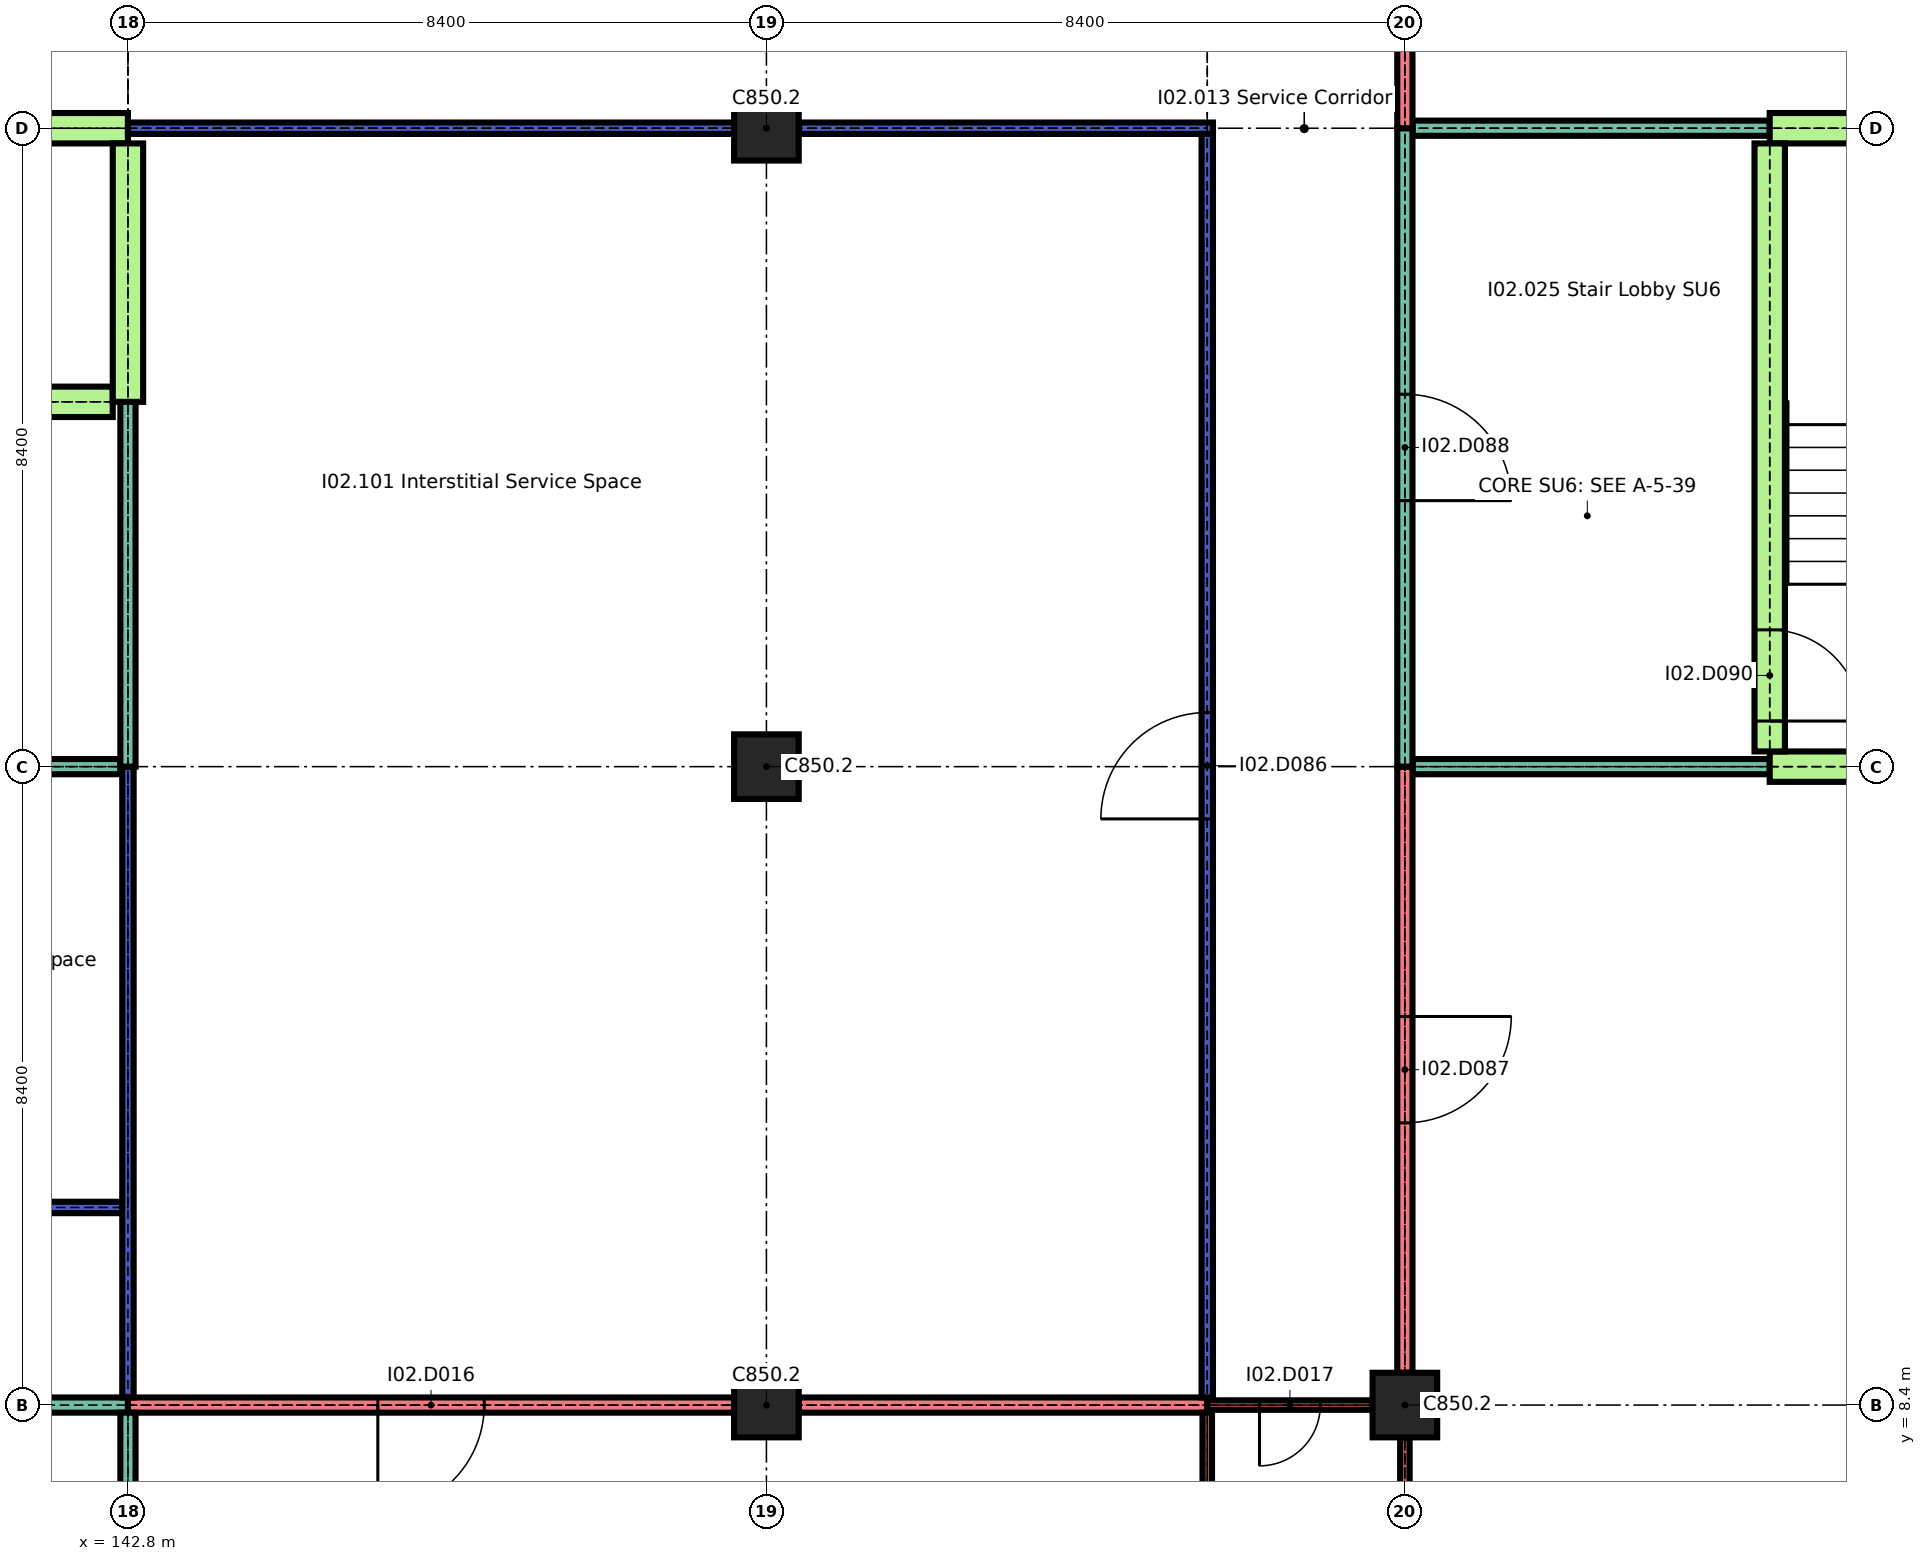
"""IFC4 building model, lengths in metres.
Left out: names, types, materials, properties, quantities, classifications, styles, units other than length and angle.
Written with IfcOpenShell. Run it as: python <this file> out.ifc"""

import sys

from ifc_helpers import new_model, si_unit, direction, frame, frame_2d, origin, origin_2d, place, context, subcontext, project, spatial, rectangle, extrude, element, fill, save


model = new_model("IFC4")
c1 = context("Model", 3, precision=1e-05, world=origin(), true_north=direction((0.0, 1.0)))
c2 = subcontext(c1, "Body", "Model", "MODEL_VIEW")
j1 = project(units=[si_unit("LENGTHUNIT", "METRE"), si_unit("PLANEANGLEUNIT", "RADIAN")], contexts=[c1])
p1 = place(None, origin())
s1 = spatial("IfcSite", under=j1, at=p1, CompositionType="ELEMENT")
p2 = place(p1, origin())
s2 = spatial("IfcBuilding", under=s1, at=p2, CompositionType="ELEMENT")
p3 = place(p2, frame((0.0, 0.0, 12.9)))
s3 = spatial("IfcBuildingStorey", under=s2, at=p3, CompositionType="ELEMENT", Elevation=12.9)
for number, where, z_axis, x_axis in (
    (1, (151.2, 8.4, 0.0), (0.0, 0.0, 1.0), (1.0, 0.0, 0.0)),
    (2, (159.6, 8.4, 0.0), (0.0, 0.0, 1.0), (1.0, 0.0, 0.0)),
    (3, (151.2, 16.8, 0.0), (0.0, 0.0, 1.0), (1.0, 0.0, 0.0)),
    (4, (151.2, 25.2, 0.0), (0.0, 0.0, 1.0), (1.0, 0.0, 0.0)),
):
    element("IfcColumn", number, at=place(p3, frame(where, z_axis=z_axis, x_axis=x_axis)), inside=s3, PredefinedType="COLUMN", context=c2, shape_type="SweptSolid", body=[
        extrude(rectangle(XDim=0.85, YDim=0.85, at=origin_2d()), origin(), (0.0, 0.0, 1.0), 2.04),
    ])
p4 = place(p3, frame((134.4, 8.4, 0.0), z_axis=(0.0, 0.0, 1.0), x_axis=(1.0, 0.0, 0.0)))
e5 = element("IfcWall", 5, at=p4, inside=s3, PredefinedType="PARTITIONING", context=c2, shape_type="SweptSolid", body=[
    extrude(rectangle(XDim=8.4, YDim=0.2, at=frame_2d((4.2, 0.0))), origin(), (0.0, 0.0, 1.0), 2.04),
])
p5 = place(p4, frame((3.5, 0.0, 0.0)))
e6 = element("IfcOpeningElement", 6, at=p5, cuts=e5, PredefinedType="OPENING", context=c2, shape_type="SweptSolid", body=[
    extrude(rectangle(XDim=1.4, YDim=2.0, at=frame_2d((0.7, 1.0))), frame((0.0, 0.11, 0.0), z_axis=(0.0, -1.0, 0.0), x_axis=(1.0, 0.0, 0.0)), (0.0, 0.0, 1.0), 0.22),
])
p6 = place(p3, frame((142.8, 8.4, 0.0), z_axis=(0.0, 0.0, 1.0), x_axis=(1.0, 0.0, 0.0)))
e7 = element("IfcWall", 7, at=p6, inside=s3, PredefinedType="SOLIDWALL", context=c2, shape_type="SweptSolid", body=[
    extrude(rectangle(XDim=7.975, YDim=0.2, at=frame_2d((3.987, 0.0))), origin(), (0.0, 0.0, 1.0), 2.04),
])
p7 = place(p6, frame((3.288, 0.0, 0.0)))
e8 = element("IfcOpeningElement", 8, at=p7, cuts=e7, PredefinedType="OPENING", context=c2, shape_type="SweptSolid", body=[
    extrude(rectangle(XDim=1.4, YDim=2.0, at=frame_2d((0.7, 1.0))), frame((0.0, 0.11, 0.0), z_axis=(0.0, -1.0, 0.0), x_axis=(1.0, 0.0, 0.0)), (0.0, 0.0, 1.0), 0.22),
])
p8 = place(p3, frame((151.625, 8.4, 0.0), z_axis=(0.0, 0.0, 1.0), x_axis=(1.0, 0.0, 0.0)))
e9 = element("IfcWall", 9, at=p8, inside=s3, PredefinedType="SOLIDWALL", context=c2, shape_type="SweptSolid", body=[
    extrude(rectangle(XDim=5.375, YDim=0.2, at=frame_2d((2.688, 0.0))), origin(), (0.0, 0.0, 1.0), 2.04),
])
p9 = place(p3, frame((157.0, 8.4, 0.0), z_axis=(0.0, 0.0, 1.0), x_axis=(1.0, 0.0, 0.0)))
e10 = element("IfcWall", 10, at=p9, inside=s3, PredefinedType="SOLIDWALL", context=c2, shape_type="SweptSolid", body=[
    extrude(rectangle(XDim=2.175, YDim=0.125, at=frame_2d((1.087, 0.0))), origin(), (0.0, 0.0, 1.0), 2.04),
])
p10 = place(p9, frame((0.688, 0.0, 0.0)))
e11 = element("IfcOpeningElement", 11, at=p10, cuts=e10, PredefinedType="OPENING", context=c2, shape_type="SweptSolid", body=[
    extrude(rectangle(XDim=0.8, YDim=2.0, at=frame_2d((0.4, 1.0))), frame((0.0, 0.073, 0.0), z_axis=(0.0, -1.0, 0.0), x_axis=(1.0, 0.0, 0.0)), (0.0, 0.0, 1.0), 0.145),
])
p11 = place(p3, frame((134.325, 11.0, 0.0), z_axis=(0.0, 0.0, 1.0), x_axis=(1.0, 0.0, 0.0)))
e12 = element("IfcWall", 12, at=p11, inside=s3, PredefinedType="PARTITIONING", context=c2, shape_type="SweptSolid", body=[
    extrude(rectangle(XDim=8.4, YDim=0.15, at=frame_2d((4.2, 0.0))), origin(), (0.0, 0.0, 1.0), 2.04),
])
p12 = place(p11, frame((3.538, 0.0, 0.0)))
e13 = element("IfcOpeningElement", 13, at=p12, cuts=e12, PredefinedType="OPENING", context=c2, shape_type="SweptSolid", body=[
    extrude(rectangle(XDim=1.4, YDim=2.0, at=frame_2d((0.7, 1.0))), frame((0.0, 0.085, 0.0), z_axis=(0.0, -1.0, 0.0), x_axis=(1.0, 0.0, 0.0)), (0.0, 0.0, 1.0), 0.17),
])
p13 = place(p3, frame((117.7, 16.8, 0.0), z_axis=(0.0, 0.0, 1.0), x_axis=(1.0, 0.0, 0.0)))
e14 = element("IfcWall", 14, at=p13, inside=s3, PredefinedType="PARTITIONING", context=c2, shape_type="SweptSolid", body=[
    extrude(rectangle(XDim=25.0, YDim=0.2, at=frame_2d((12.5, 0.0))), origin(), (0.0, 0.0, 1.0), 2.04),
])
p14 = place(p13, frame((3.15, 0.0, 0.0)))
e15 = element("IfcOpeningElement", 15, at=p14, cuts=e14, PredefinedType="OPENING", context=c2, shape_type="SweptSolid", body=[
    extrude(rectangle(XDim=2.0, YDim=2.0, at=frame_2d((1.0, 1.0))), frame((0.0, 0.11, 0.0), z_axis=(0.0, -1.0, 0.0), x_axis=(1.0, 0.0, 0.0)), (0.0, 0.0, 1.0), 0.22),
])
p15 = place(p13, frame((11.5, 0.0, 0.0)))
e16 = element("IfcOpeningElement", 16, at=p15, cuts=e14, PredefinedType="OPENING", context=c2, shape_type="SweptSolid", body=[
    extrude(rectangle(XDim=2.0, YDim=2.0, at=frame_2d((1.0, 1.0))), frame((0.0, 0.11, 0.0), z_axis=(0.0, -1.0, 0.0), x_axis=(1.0, 0.0, 0.0)), (0.0, 0.0, 1.0), 0.22),
])
p16 = place(p3, frame((159.7, 16.8, 0.0), z_axis=(0.0, 0.0, 1.0), x_axis=(1.0, 0.0, 0.0)))
e17 = element("IfcWall", 17, at=p16, inside=s3, PredefinedType="PARTITIONING", context=c2, shape_type="SweptSolid", body=[
    extrude(rectangle(XDim=4.7, YDim=0.2, at=frame_2d((2.35, 0.0))), origin(), (0.0, 0.0, 1.0), 2.04),
])
p17 = place(p3, frame((164.4, 16.8, 0.0), z_axis=(0.0, 0.0, 1.0), x_axis=(1.0, 0.0, 0.0)))
e18 = element("IfcWall", 18, at=p17, inside=s3, PredefinedType="SHEAR", context=c2, shape_type="SweptSolid", body=[
    extrude(rectangle(XDim=3.45, YDim=0.4, at=frame_2d((1.725, 0.0))), origin(), (0.0, 0.0, 1.0), 2.04),
])
p18 = place(p3, frame((117.8, 21.6, 0.0), z_axis=(0.0, 0.0, 1.0), x_axis=(1.0, 0.0, 0.0)))
e19 = element("IfcWall", 19, at=p18, inside=s3, PredefinedType="SHEAR", context=c2, shape_type="SweptSolid", body=[
    extrude(rectangle(XDim=24.8, YDim=0.4, at=frame_2d((12.4, 0.0))), origin(), (0.0, 0.0, 1.0), 2.04),
])
p19 = place(p18, frame((1.3, 0.0, 0.0)))
e20 = element("IfcOpeningElement", 20, at=p19, cuts=e19, PredefinedType="OPENING", context=c2, shape_type="SweptSolid", body=[
    extrude(rectangle(XDim=1.4, YDim=2.0, at=frame_2d((0.7, 1.0))), frame((0.0, 0.21, 0.0), z_axis=(0.0, -1.0, 0.0), x_axis=(1.0, 0.0, 0.0)), (0.0, 0.0, 1.0), 0.42),
])
p20 = place(p18, frame((5.4, 0.0, 0.0)))
e21 = element("IfcOpeningElement", 21, at=p20, cuts=e19, PredefinedType="OPENING", context=c2, shape_type="SweptSolid", body=[
    extrude(rectangle(XDim=1.4, YDim=2.0, at=frame_2d((0.7, 1.0))), frame((0.0, 0.21, 0.0), z_axis=(0.0, -1.0, 0.0), x_axis=(1.0, 0.0, 0.0)), (0.0, 0.0, 1.0), 0.42),
])
p21 = place(p18, frame((9.6, 0.0, 0.0)))
e22 = element("IfcOpeningElement", 22, at=p21, cuts=e19, PredefinedType="OPENING", context=c2, shape_type="SweptSolid", body=[
    extrude(rectangle(XDim=1.4, YDim=2.0, at=frame_2d((0.7, 1.0))), frame((0.0, 0.21, 0.0), z_axis=(0.0, -1.0, 0.0), x_axis=(1.0, 0.0, 0.0)), (0.0, 0.0, 1.0), 0.42),
])
p22 = place(p3, frame((117.6, 25.2, 0.0), z_axis=(0.0, 0.0, 1.0), x_axis=(1.0, 0.0, 0.0)))
e23 = element("IfcWall", 23, at=p22, inside=s3, PredefinedType="SHEAR", context=c2, shape_type="SweptSolid", body=[
    extrude(rectangle(XDim=25.2, YDim=0.4, at=frame_2d((12.6, 0.0))), origin(), (0.0, 0.0, 1.0), 2.04),
])
p23 = place(p3, frame((142.8, 25.2, 0.0), z_axis=(0.0, 0.0, 1.0), x_axis=(1.0, 0.0, 0.0)))
e24 = element("IfcWall", 24, at=p23, inside=s3, PredefinedType="PARTITIONING", context=c2, shape_type="SweptSolid", body=[
    extrude(rectangle(XDim=7.975, YDim=0.15, at=frame_2d((3.987, 0.0))), origin(), (0.0, 0.0, 1.0), 2.04),
])
p24 = place(p3, frame((151.625, 25.2, 0.0), z_axis=(0.0, 0.0, 1.0), x_axis=(1.0, 0.0, 0.0)))
e25 = element("IfcWall", 25, at=p24, inside=s3, PredefinedType="PARTITIONING", context=c2, shape_type="SweptSolid", body=[
    extrude(rectangle(XDim=5.45, YDim=0.15, at=frame_2d((2.725, 0.0))), origin(), (0.0, 0.0, 1.0), 2.04),
])
p25 = place(p3, frame((159.7, 25.2, 0.0), z_axis=(0.0, 0.0, 1.0), x_axis=(1.0, 0.0, 0.0)))
e26 = element("IfcWall", 26, at=p25, inside=s3, PredefinedType="PARTITIONING", context=c2, shape_type="SweptSolid", body=[
    extrude(rectangle(XDim=4.7, YDim=0.2, at=frame_2d((2.35, 0.0))), origin(), (0.0, 0.0, 1.0), 2.04),
])
p26 = place(p3, frame((164.4, 25.2, 0.0), z_axis=(0.0, 0.0, 1.0), x_axis=(1.0, 0.0, 0.0)))
e27 = element("IfcWall", 27, at=p26, inside=s3, PredefinedType="SHEAR", context=c2, shape_type="SweptSolid", body=[
    extrude(rectangle(XDim=3.45, YDim=0.4, at=frame_2d((1.725, 0.0))), origin(), (0.0, 0.0, 1.0), 2.04),
])
p27 = place(p3, frame((142.8, 3.6, 0.0), z_axis=(0.0, 0.0, 1.0), x_axis=(0.0, 1.0, 0.0)))
e28 = element("IfcWall", 28, at=p27, inside=s3, PredefinedType="PARTITIONING", context=c2, shape_type="SweptSolid", body=[
    extrude(rectangle(XDim=4.7, YDim=0.2, at=frame_2d((2.35, 0.0))), origin(), (0.0, 0.0, 1.0), 2.04),
])
p28 = place(p3, frame((142.8, 8.5, 0.0), z_axis=(0.0, 0.0, 1.0), x_axis=(0.0, 1.0, 0.0)))
e29 = element("IfcWall", 29, at=p28, inside=s3, PredefinedType="PARTITIONING", context=c2, shape_type="SweptSolid", body=[
    extrude(rectangle(XDim=8.3, YDim=0.15, at=frame_2d((4.15, 0.0))), origin(), (0.0, 0.0, 1.0), 2.04),
])
p29 = place(p3, frame((142.8, 16.8, 0.0), z_axis=(0.0, 0.0, 1.0), x_axis=(0.0, 1.0, 0.0)))
e30 = element("IfcWall", 30, at=p29, inside=s3, PredefinedType="PARTITIONING", context=c2, shape_type="SweptSolid", body=[
    extrude(rectangle(XDim=4.8, YDim=0.2, at=frame_2d((2.4, 0.0))), origin(), (0.0, 0.0, 1.0), 2.04),
])
p30 = place(p3, frame((142.8, 21.6, 0.0), z_axis=(0.0, 0.0, 1.0), x_axis=(0.0, 1.0, 0.0)))
e31 = element("IfcWall", 31, at=p30, inside=s3, PredefinedType="SHEAR", context=c2, shape_type="SweptSolid", body=[
    extrude(rectangle(XDim=3.4, YDim=0.4, at=frame_2d((1.7, 0.0))), origin(), (0.0, 0.0, 1.0), 2.04),
])
p31 = place(p3, frame((157.0, 0.15, 0.0), z_axis=(0.0, 0.0, 1.0), x_axis=(0.0, 1.0, 0.0)))
e32 = element("IfcWall", 32, at=p31, inside=s3, PredefinedType="SOLIDWALL", context=c2, shape_type="SweptSolid", body=[
    extrude(rectangle(XDim=8.15, YDim=0.125, at=frame_2d((4.075, 0.0))), origin(), (0.0, 0.0, 1.0), 2.04),
])
p32 = place(p3, frame((157.0, 8.5, 0.0), z_axis=(0.0, 0.0, 1.0), x_axis=(0.0, 1.0, 0.0)))
e33 = element("IfcWall", 33, at=p32, inside=s3, PredefinedType="PARTITIONING", context=c2, shape_type="SweptSolid", body=[
    extrude(rectangle(XDim=16.625, YDim=0.15, at=frame_2d((8.312, 0.0))), origin(), (0.0, 0.0, 1.0), 2.04),
])
p33 = place(p32, frame((7.613, 0.0, 0.0)))
e34 = element("IfcOpeningElement", 34, at=p33, cuts=e33, PredefinedType="OPENING", context=c2, shape_type="SweptSolid", body=[
    extrude(rectangle(XDim=1.4, YDim=2.0, at=frame_2d((0.7, 1.0))), frame((0.0, 0.085, 0.0), z_axis=(0.0, -1.0, 0.0), x_axis=(1.0, 0.0, 0.0)), (0.0, 0.0, 1.0), 0.17),
])
p34 = place(p3, frame((159.6, 0.425, 0.0), z_axis=(0.0, 0.0, 1.0), x_axis=(0.0, 1.0, 0.0)))
e35 = element("IfcWall", 35, at=p34, inside=s3, PredefinedType="SOLIDWALL", context=c2, shape_type="SweptSolid", body=[
    extrude(rectangle(XDim=7.55, YDim=0.125, at=frame_2d((3.775, 0.0))), origin(), (0.0, 0.0, 1.0), 2.04),
])
p35 = place(p3, frame((159.6, 8.825, 0.0), z_axis=(0.0, 0.0, 1.0), x_axis=(0.0, 1.0, 0.0)))
e36 = element("IfcWall", 36, at=p35, inside=s3, PredefinedType="SOLIDWALL", context=c2, shape_type="SweptSolid", body=[
    extrude(rectangle(XDim=7.975, YDim=0.2, at=frame_2d((3.988, 0.0))), origin(), (0.0, 0.0, 1.0), 2.04),
])
p36 = place(p35, frame((3.288, 0.0, 0.0)))
e37 = element("IfcOpeningElement", 37, at=p36, cuts=e36, PredefinedType="OPENING", context=c2, shape_type="SweptSolid", body=[
    extrude(rectangle(XDim=1.4, YDim=2.0, at=frame_2d((0.7, 1.0))), frame((0.0, 0.11, 0.0), z_axis=(0.0, -1.0, 0.0), x_axis=(1.0, 0.0, 0.0)), (0.0, 0.0, 1.0), 0.22),
])
p37 = place(p3, frame((159.6, 16.8, 0.0), z_axis=(0.0, 0.0, 1.0), x_axis=(0.0, 1.0, 0.0)))
e38 = element("IfcWall", 38, at=p37, inside=s3, PredefinedType="PARTITIONING", context=c2, shape_type="SweptSolid", body=[
    extrude(rectangle(XDim=8.4, YDim=0.2, at=frame_2d((4.2, 0.0))), origin(), (0.0, 0.0, 1.0), 2.04),
])
p38 = place(p37, frame((3.5, 0.0, 0.0)))
e39 = element("IfcOpeningElement", 39, at=p38, cuts=e38, PredefinedType="OPENING", context=c2, shape_type="SweptSolid", body=[
    extrude(rectangle(XDim=1.4, YDim=2.0, at=frame_2d((0.7, 1.0))), frame((0.0, 0.11, 0.0), z_axis=(0.0, -1.0, 0.0), x_axis=(1.0, 0.0, 0.0)), (0.0, 0.0, 1.0), 0.22),
])
p39 = place(p3, frame((159.6, 25.2, 0.0), z_axis=(0.0, 0.0, 1.0), x_axis=(0.0, 1.0, 0.0)))
e40 = element("IfcWall", 40, at=p39, inside=s3, PredefinedType="SOLIDWALL", context=c2, shape_type="SweptSolid", body=[
    extrude(rectangle(XDim=7.975, YDim=0.2, at=frame_2d((3.988, 0.0))), origin(), (0.0, 0.0, 1.0), 2.04),
])
p40 = place(p39, frame((3.488, 0.0, 0.0)))
e41 = element("IfcOpeningElement", 41, at=p40, cuts=e40, PredefinedType="OPENING", context=c2, shape_type="SweptSolid", body=[
    extrude(rectangle(XDim=1.0, YDim=2.0, at=frame_2d((0.5, 1.0))), frame((0.0, 0.11, 0.0), z_axis=(0.0, -1.0, 0.0), x_axis=(1.0, 0.0, 0.0)), (0.0, 0.0, 1.0), 0.22),
])
p41 = place(p3, frame((164.4, 17.0, 0.0), z_axis=(0.0, 0.0, 1.0), x_axis=(0.0, 1.0, 0.0)))
e42 = element("IfcWall", 42, at=p41, inside=s3, PredefinedType="SHEAR", context=c2, shape_type="SweptSolid", body=[
    extrude(rectangle(XDim=8.0, YDim=0.4, at=frame_2d((4.0, 0.0))), origin(), (0.0, 0.0, 1.0), 2.04),
])
p42 = place(p41, frame((0.4, 0.0, 0.0)))
e43 = element("IfcOpeningElement", 43, at=p42, cuts=e42, PredefinedType="OPENING", context=c2, shape_type="SweptSolid", body=[
    extrude(rectangle(XDim=1.2, YDim=2.0, at=frame_2d((0.6, 1.0))), frame((0.0, 0.21, 0.0), z_axis=(0.0, -1.0, 0.0), x_axis=(1.0, 0.0, 0.0)), (0.0, 0.0, 1.0), 0.42),
])
p43 = place(p7, origin())
e44 = element("IfcDoor", 44, at=p43, inside=s3, OperationType="SINGLE_SWING_LEFT", PredefinedType="DOOR", context=c2, shape_type="SweptSolid", body=[
    extrude(rectangle(XDim=1.4, YDim=2.0, at=frame_2d((0.7, 1.0))), frame((0.0, 0.025, 0.0), z_axis=(0.0, -1.0, 0.0), x_axis=(1.0, 0.0, 0.0)), (0.0, 0.0, 1.0), 0.05),
])
fill(e8, e44)
p44 = place(p10, origin())
e45 = element("IfcDoor", 45, at=p44, inside=s3, OperationType="SINGLE_SWING_LEFT", PredefinedType="DOOR", context=c2, shape_type="SweptSolid", body=[
    extrude(rectangle(XDim=0.8, YDim=2.0, at=frame_2d((0.4, 1.0))), frame((0.0, 0.03, 0.0), z_axis=(0.0, -1.0, 0.0), x_axis=(1.0, 0.0, 0.0)), (0.0, 0.0, 1.0), 0.06),
])
fill(e11, e45)
p45 = place(p33, origin())
e46 = element("IfcDoor", 46, at=p45, inside=s3, OperationType="SINGLE_SWING_RIGHT", PredefinedType="DOOR", context=c2, shape_type="SweptSolid", body=[
    extrude(rectangle(XDim=1.4, YDim=2.0, at=frame_2d((0.7, 1.0))), frame((0.0, 0.025, 0.0), z_axis=(0.0, -1.0, 0.0), x_axis=(1.0, 0.0, 0.0)), (0.0, 0.0, 1.0), 0.05),
])
fill(e34, e46)
p46 = place(p36, origin())
e47 = element("IfcDoor", 47, at=p46, inside=s3, OperationType="SINGLE_SWING_RIGHT", PredefinedType="DOOR", context=c2, shape_type="SweptSolid", body=[
    extrude(rectangle(XDim=1.4, YDim=2.0, at=frame_2d((0.7, 1.0))), frame((0.0, 0.025, 0.0), z_axis=(0.0, -1.0, 0.0), x_axis=(1.0, 0.0, 0.0)), (0.0, 0.0, 1.0), 0.05),
])
fill(e37, e47)
p47 = place(p38, origin())
e48 = element("IfcDoor", 48, at=p47, inside=s3, OperationType="SINGLE_SWING_LEFT", PredefinedType="DOOR", context=c2, shape_type="SweptSolid", body=[
    extrude(rectangle(XDim=1.4, YDim=2.0, at=frame_2d((0.7, 1.0))), frame((0.0, 0.03, 0.0), z_axis=(0.0, -1.0, 0.0), x_axis=(1.0, 0.0, 0.0)), (0.0, 0.0, 1.0), 0.06),
])
fill(e39, e48)
p48 = place(p42, origin())
e49 = element("IfcDoor", 49, at=p48, inside=s3, OperationType="SINGLE_SWING_LEFT", PredefinedType="DOOR", context=c2, shape_type="SweptSolid", body=[
    extrude(rectangle(XDim=1.2, YDim=2.0, at=frame_2d((0.6, 1.0))), frame((0.0, 0.025, 0.0), z_axis=(0.0, -1.0, 0.0), x_axis=(1.0, 0.0, 0.0)), (0.0, 0.0, 1.0), 0.05),
])
fill(e43, e49)
save(model, sys.argv[1])
